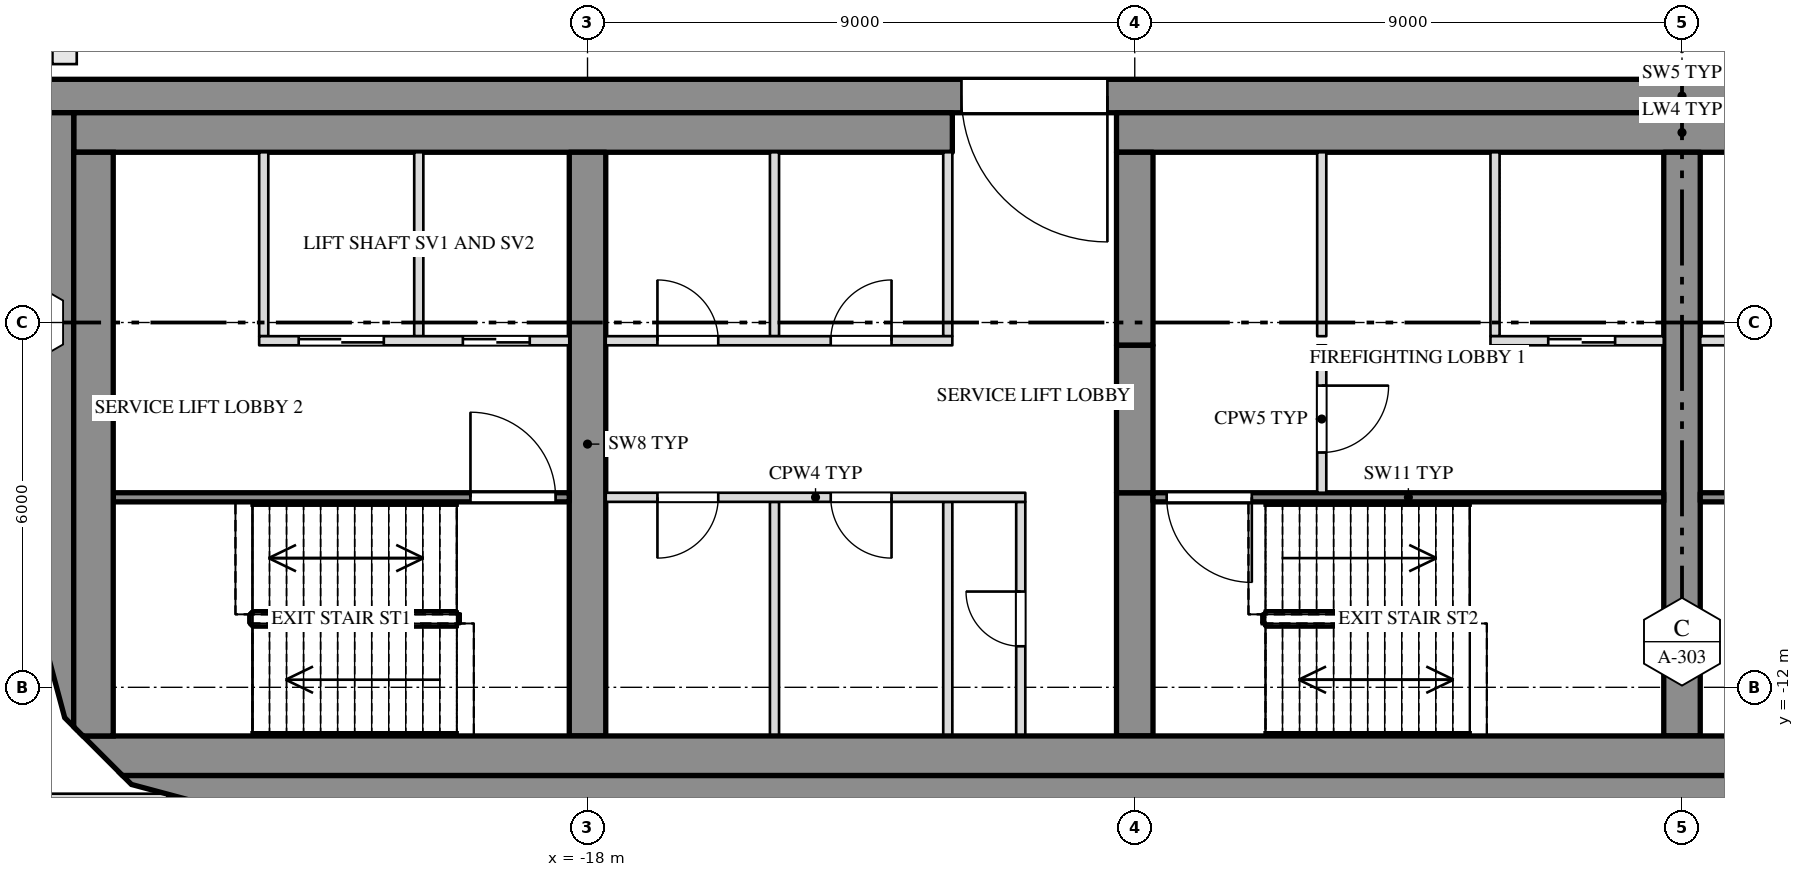
"""IFC4 building model, lengths in metres.
Left out: names, types, materials, properties, quantities, classifications, styles, units other than length and angle.
Written with IfcOpenShell. Run it as: python <this file> out.ifc"""

import sys

from ifc_helpers import new_model, si_unit, direction, frame, frame_2d, origin, place, context, subcontext, project, spatial, polyline, rectangle, outline, extrude, element, fill, save


model = new_model("IFC4")
c1 = context("Model", 3, precision=1e-05, world=origin(), true_north=direction((0.0, 1.0)))
c2 = subcontext(c1, "Body", "Model", "MODEL_VIEW")
j1 = project(units=[si_unit("LENGTHUNIT", "METRE"), si_unit("PLANEANGLEUNIT", "RADIAN")], contexts=[c1])
p1 = place(None, origin())
s1 = spatial("IfcSite", under=j1, at=p1, CompositionType="ELEMENT")
p2 = place(p1, origin())
s2 = spatial("IfcBuilding", under=s1, at=p2, CompositionType="ELEMENT")
p3 = place(p2, frame((0.0, 0.0, 296.5)))
s3 = spatial("IfcBuildingStorey", under=s2, at=p3, CompositionType="ELEMENT", Elevation=296.5)
p4 = place(p3, frame((-27.0, -2.275, 0.0), z_axis=(0.0, 0.0, 1.0), x_axis=(1.0, 0.0, 0.0)))
e1 = element("IfcWall", 1, at=p4, inside=s3, PredefinedType="SHEAR", context=c2, shape_type="SweptSolid", body=[
    extrude(rectangle(XDim=54.0, YDim=0.55, at=frame_2d((27.0, 0.0))), origin(), (0.0, 0.0, 1.0), 8.65),
])
p5 = place(p4, frame((15.15, 0.0, 0.0)))
e2 = element("IfcOpeningElement", 2, at=p5, cuts=e1, PredefinedType="OPENING", context=c2, shape_type="SweptSolid", body=[
    extrude(rectangle(XDim=2.4, YDim=2.1, at=frame_2d((1.2, 1.05))), frame((0.0, 0.287, 0.0), z_axis=(0.0, -1.0, 0.0), x_axis=(1.0, 0.0, 0.0)), (0.0, 0.0, 1.0), 0.574),
])
p6 = place(p4, frame((36.45, 0.0, 0.0)))
e3 = element("IfcOpeningElement", 3, at=p6, cuts=e1, PredefinedType="OPENING", context=c2, shape_type="SweptSolid", body=[
    extrude(rectangle(XDim=2.4, YDim=2.1, at=frame_2d((1.2, 1.05))), frame((0.0, 0.287, 0.0), z_axis=(0.0, -1.0, 0.0), x_axis=(1.0, 0.0, 0.0)), (0.0, 0.0, 1.0), 0.574),
])
p7 = place(p3, origin())
e4 = element("IfcWall", 4, at=p7, inside=s3, PredefinedType="SHEAR", context=c2, shape_type="SweptSolid", body=[
    extrude(outline(polyline([(25.648, -13.45), (25.5, -13.598), (24.0, -14.0), (-24.0, -14.0), (-25.5, -13.598), (-25.648, -13.45), (25.648, -13.45)])), origin(), (0.0, 0.0, 1.0), 8.65),
])
p8 = place(p3, origin())
e5 = element("IfcWall", 5, at=p8, inside=s3, PredefinedType="SHEAR", context=c2, shape_type="SweptSolid", body=[
    extrude(outline(polyline([(-26.45, -2.55), (-26.45, -12.648), (-26.598, -12.5), (-27.0, -11.0), (-27.0, -2.55), (-26.45, -2.55)])), origin(), (0.0, 0.0, 1.0), 8.65),
])
p9 = place(p3, frame((-26.45, -2.875, 0.0), z_axis=(0.0, 0.0, 1.0), x_axis=(1.0, 0.0, 0.0)))
e6 = element("IfcWall", 6, at=p9, inside=s3, PredefinedType="SHEAR", context=c2, shape_type="SweptSolid", body=[
    extrude(rectangle(XDim=14.45, YDim=0.65, at=frame_2d((7.225, 0.0))), origin(), (0.0, 0.0, 1.0), 8.65),
])
p10 = place(p3, frame((-9.3, -2.875, 0.0), z_axis=(0.0, 0.0, 1.0), x_axis=(1.0, 0.0, 0.0)))
e7 = element("IfcWall", 7, at=p10, inside=s3, PredefinedType="SHEAR", context=c2, shape_type="SweptSolid", body=[
    extrude(rectangle(XDim=18.6, YDim=0.65, at=frame_2d((9.3, 0.0))), origin(), (0.0, 0.0, 1.0), 8.65),
])
p11 = place(p3, origin())
e8 = element("IfcWall", 8, at=p11, inside=s3, PredefinedType="SHEAR", context=c2, shape_type="SweptSolid", body=[
    extrude(outline(polyline([(26.298, -12.8), (25.648, -13.45), (-25.648, -13.45), (-26.298, -12.8), (26.298, -12.8)])), origin(), (0.0, 0.0, 1.0), 8.65),
])
p12 = place(p3, origin())
e9 = element("IfcWall", 9, at=p12, inside=s3, PredefinedType="SHEAR", context=c2, shape_type="SweptSolid", body=[
    extrude(outline(polyline([(-26.45, -3.2), (-25.8, -3.2), (-25.8, -12.8), (-26.298, -12.8), (-26.45, -12.648), (-26.45, -3.2)])), origin(), (0.0, 0.0, 1.0), 8.65),
])
p13 = place(p3, frame((-18.0, -12.8, 0.0), z_axis=(0.0, 0.0, 1.0), x_axis=(0.0, 1.0, 0.0)))
e10 = element("IfcWall", 10, at=p13, inside=s3, PredefinedType="SHEAR", context=c2, shape_type="SweptSolid", body=[
    extrude(rectangle(XDim=9.6, YDim=0.6, at=frame_2d((4.8, 0.0))), origin(), (0.0, 0.0, 1.0), 8.65),
])
p14 = place(p3, frame((-9.0, -12.8, 0.0), z_axis=(0.0, 0.0, 1.0), x_axis=(0.0, 1.0, 0.0)))
e11 = element("IfcWall", 11, at=p14, inside=s3, PredefinedType="SHEAR", context=c2, shape_type="SweptSolid", body=[
    extrude(rectangle(XDim=4.0, YDim=0.6, at=frame_2d((2.0, 0.0))), origin(), (0.0, 0.0, 1.0), 8.65),
])
p15 = place(p3, frame((-9.0, -6.375, 0.0), z_axis=(0.0, 0.0, 1.0), x_axis=(0.0, 1.0, 0.0)))
e12 = element("IfcWall", 12, at=p15, inside=s3, PredefinedType="SHEAR", context=c2, shape_type="SweptSolid", body=[
    extrude(rectangle(XDim=3.175, YDim=0.6, at=frame_2d((1.587, 0.0))), origin(), (0.0, 0.0, 1.0), 8.65),
])
p16 = place(p3, frame((-9.0, -8.8, 3.6), z_axis=(0.0, 0.0, 1.0), x_axis=(0.0, 1.0, 0.0)))
e13 = element("IfcWall", 13, at=p16, inside=s3, PredefinedType="SHEAR", context=c2, shape_type="SweptSolid", body=[
    extrude(rectangle(XDim=2.425, YDim=0.6, at=frame_2d((1.212, 0.0))), origin(), (0.0, 0.0, 1.0), 5.05),
])
p17 = place(p3, frame((0.0, -12.8, 0.0), z_axis=(0.0, 0.0, 1.0), x_axis=(0.0, 1.0, 0.0)))
e14 = element("IfcWall", 14, at=p17, inside=s3, PredefinedType="SHEAR", context=c2, shape_type="SweptSolid", body=[
    extrude(rectangle(XDim=9.6, YDim=0.6, at=frame_2d((4.8, 0.0))), origin(), (0.0, 0.0, 1.0), 8.65),
])
p18 = place(p3, frame((-26.967, -13.875, 0.0), z_axis=(0.0, 0.0, 1.0), x_axis=(1.0, 0.0, 0.0)))
e15 = element("IfcWall", 15, at=p18, inside=s3, PredefinedType="PARAPET", context=c2, shape_type="SweptSolid", body=[
    extrude(rectangle(XDim=2.057, YDim=0.25, at=frame_2d((1.028, 0.0))), origin(), (0.0, 0.0, 1.0), 1.1),
])
for number, where, z_axis, x_axis in (
    (16, (-20.775, -6.225, 0.0), (0.0, 0.0, 1.0), (0.0, 1.0, 0.0)),
    (17, (-23.325, -6.225, 0.0), (0.0, 0.0, 1.0), (0.0, 1.0, 0.0)),
    (18, (-12.075, -6.225, 0.0), (0.0, 0.0, 1.0), (0.0, 1.0, 0.0)),
    (19, (-14.925, -6.225, 0.0), (0.0, 0.0, 1.0), (0.0, 1.0, 0.0)),
    (20, (-3.075, -6.225, 0.0), (0.0, 0.0, 1.0), (0.0, 1.0, 0.0)),
    (21, (-5.925, -6.225, 0.0), (0.0, 0.0, 1.0), (0.0, 1.0, 0.0)),
):
    element("IfcWall", number, at=place(p3, frame(where, z_axis=z_axis, x_axis=x_axis)), inside=s3, PredefinedType="PARTITIONING", context=c2, shape_type="SweptSolid", body=[
        extrude(rectangle(XDim=3.025, YDim=0.15, at=frame_2d((1.513, 0.0))), origin(), (0.0, 0.0, 1.0), 8.65),
    ])
p19 = place(p3, frame((-10.875, -12.8, 0.0), z_axis=(0.0, 0.0, 1.0), x_axis=(0.0, 1.0, 0.0)))
e22 = element("IfcWall", 22, at=p19, inside=s3, PredefinedType="PARTITIONING", context=c2, shape_type="SweptSolid", body=[
    extrude(rectangle(XDim=3.85, YDim=0.15, at=frame_2d((1.925, 0.0))), origin(), (0.0, 0.0, 1.0), 8.65),
])
p20 = place(p19, frame((1.475, 0.0, 0.0)))
e23 = element("IfcOpeningElement", 23, at=p20, cuts=e22, PredefinedType="OPENING", context=c2, shape_type="SweptSolid", body=[
    extrude(rectangle(XDim=0.9, YDim=2.1, at=frame_2d((0.45, 1.05))), frame((0.0, 0.087, 0.0), z_axis=(0.0, -1.0, 0.0), x_axis=(1.0, 0.0, 0.0)), (0.0, 0.0, 1.0), 0.174),
])
for number, where, z_axis, x_axis in (
    (24, (-12.075, -12.8, 0.0), (0.0, 0.0, 1.0), (0.0, 1.0, 0.0)),
    (25, (-14.925, -12.8, 0.0), (0.0, 0.0, 1.0), (0.0, 1.0, 0.0)),
):
    element("IfcWall", number, at=place(p3, frame(where, z_axis=z_axis, x_axis=x_axis)), inside=s3, PredefinedType="PARTITIONING", context=c2, shape_type="SweptSolid", body=[
        extrude(rectangle(XDim=3.85, YDim=0.15, at=frame_2d((1.925, 0.0))), origin(), (0.0, 0.0, 1.0), 8.65),
    ])
p21 = place(p3, frame((-5.925, -8.8, 0.0), z_axis=(0.0, 0.0, 1.0), x_axis=(0.0, 1.0, 0.0)))
e26 = element("IfcWall", 26, at=p21, inside=s3, PredefinedType="PARTITIONING", context=c2, shape_type="SweptSolid", body=[
    extrude(rectangle(XDim=2.425, YDim=0.15, at=frame_2d((1.212, 0.0))), origin(), (0.0, 0.0, 1.0), 8.65),
])
p22 = place(p21, frame((0.662, 0.0, 0.0)))
e27 = element("IfcOpeningElement", 27, at=p22, cuts=e26, PredefinedType="OPENING", context=c2, shape_type="SweptSolid", body=[
    extrude(rectangle(XDim=1.1, YDim=2.1, at=frame_2d((0.55, 1.05))), frame((0.0, 0.087, 0.0), z_axis=(0.0, -1.0, 0.0), x_axis=(1.0, 0.0, 0.0)), (0.0, 0.0, 1.0), 0.174),
])
p23 = place(p3, frame((-23.4, -6.3, 0.0), z_axis=(0.0, 0.0, 1.0), x_axis=(1.0, 0.0, 0.0)))
e28 = element("IfcWall", 28, at=p23, inside=s3, PredefinedType="PARTITIONING", context=c2, shape_type="SweptSolid", body=[
    extrude(rectangle(XDim=5.1, YDim=0.15, at=frame_2d((2.55, 0.0))), origin(), (0.0, 0.0, 1.0), 8.65),
])
p24 = place(p23, frame((0.65, 0.0, 0.0)))
e29 = element("IfcOpeningElement", 29, at=p24, cuts=e28, PredefinedType="OPENING", context=c2, shape_type="SweptSolid", body=[
    extrude(rectangle(XDim=1.4, YDim=2.1, at=frame_2d((0.7, 1.05))), frame((0.0, 0.087, 0.0), z_axis=(0.0, -1.0, 0.0), x_axis=(1.0, 0.0, 0.0)), (0.0, 0.0, 1.0), 0.174),
])
p25 = place(p23, frame((3.35, 0.0, 0.0)))
e30 = element("IfcOpeningElement", 30, at=p25, cuts=e28, PredefinedType="OPENING", context=c2, shape_type="SweptSolid", body=[
    extrude(rectangle(XDim=1.1, YDim=2.1, at=frame_2d((0.55, 1.05))), frame((0.0, 0.087, 0.0), z_axis=(0.0, -1.0, 0.0), x_axis=(1.0, 0.0, 0.0)), (0.0, 0.0, 1.0), 0.174),
])
p26 = place(p3, frame((-17.7, -6.3, 0.0), z_axis=(0.0, 0.0, 1.0), x_axis=(1.0, 0.0, 0.0)))
e31 = element("IfcWall", 31, at=p26, inside=s3, PredefinedType="PARTITIONING", context=c2, shape_type="SweptSolid", body=[
    extrude(rectangle(XDim=5.7, YDim=0.15, at=frame_2d((2.85, 0.0))), origin(), (0.0, 0.0, 1.0), 8.65),
])
p27 = place(p26, frame((0.85, 0.0, 0.0)))
e32 = element("IfcOpeningElement", 32, at=p27, cuts=e31, PredefinedType="OPENING", context=c2, shape_type="SweptSolid", body=[
    extrude(rectangle(XDim=1.0, YDim=2.1, at=frame_2d((0.5, 1.05))), frame((0.0, 0.087, 0.0), z_axis=(0.0, -1.0, 0.0), x_axis=(1.0, 0.0, 0.0)), (0.0, 0.0, 1.0), 0.174),
])
p28 = place(p26, frame((3.7, 0.0, 0.0)))
e33 = element("IfcOpeningElement", 33, at=p28, cuts=e31, PredefinedType="OPENING", context=c2, shape_type="SweptSolid", body=[
    extrude(rectangle(XDim=1.0, YDim=2.1, at=frame_2d((0.5, 1.05))), frame((0.0, 0.087, 0.0), z_axis=(0.0, -1.0, 0.0), x_axis=(1.0, 0.0, 0.0)), (0.0, 0.0, 1.0), 0.174),
])
p29 = place(p3, frame((-3.15, -6.3, 0.0), z_axis=(0.0, 0.0, 1.0), x_axis=(1.0, 0.0, 0.0)))
e34 = element("IfcWall", 34, at=p29, inside=s3, PredefinedType="PARTITIONING", context=c2, shape_type="SweptSolid", body=[
    extrude(rectangle(XDim=2.85, YDim=0.15, at=frame_2d((1.425, 0.0))), origin(), (0.0, 0.0, 1.0), 8.65),
])
p30 = place(p29, frame((0.95, 0.0, 0.0)))
e35 = element("IfcOpeningElement", 35, at=p30, cuts=e34, PredefinedType="OPENING", context=c2, shape_type="SweptSolid", body=[
    extrude(rectangle(XDim=1.1, YDim=2.1, at=frame_2d((0.55, 1.05))), frame((0.0, 0.087, 0.0), z_axis=(0.0, -1.0, 0.0), x_axis=(1.0, 0.0, 0.0)), (0.0, 0.0, 1.0), 0.174),
])
p31 = place(p3, frame((0.3, -6.3, 0.0), z_axis=(0.0, 0.0, 1.0), x_axis=(1.0, 0.0, 0.0)))
e36 = element("IfcWall", 36, at=p31, inside=s3, PredefinedType="PARTITIONING", context=c2, shape_type="SweptSolid", body=[
    extrude(rectangle(XDim=2.85, YDim=0.15, at=frame_2d((1.425, 0.0))), origin(), (0.0, 0.0, 1.0), 8.65),
])
p32 = place(p31, frame((0.8, 0.0, 0.0)))
e37 = element("IfcOpeningElement", 37, at=p32, cuts=e36, PredefinedType="OPENING", context=c2, shape_type="SweptSolid", body=[
    extrude(rectangle(XDim=1.1, YDim=2.1, at=frame_2d((0.55, 1.05))), frame((0.0, 0.087, 0.0), z_axis=(0.0, -1.0, 0.0), x_axis=(1.0, 0.0, 0.0)), (0.0, 0.0, 1.0), 0.174),
])
p33 = place(p3, frame((-25.8, -8.875, 0.0), z_axis=(0.0, 0.0, 1.0), x_axis=(1.0, 0.0, 0.0)))
e38 = element("IfcWall", 38, at=p33, inside=s3, PredefinedType="SHEAR", context=c2, shape_type="SweptSolid", body=[
    extrude(rectangle(XDim=7.5, YDim=0.15, at=frame_2d((3.75, 0.0))), origin(), (0.0, 0.0, 1.0), 8.65),
])
p34 = place(p33, frame((5.875, 0.0, 0.0)))
e39 = element("IfcOpeningElement", 39, at=p34, cuts=e38, PredefinedType="OPENING", context=c2, shape_type="SweptSolid", body=[
    extrude(rectangle(XDim=1.4, YDim=2.1, at=frame_2d((0.7, 1.05))), frame((0.0, 0.087, 0.0), z_axis=(0.0, -1.0, 0.0), x_axis=(1.0, 0.0, 0.0)), (0.0, 0.0, 1.0), 0.174),
])
p35 = place(p3, frame((-17.7, -8.875, 0.0), z_axis=(0.0, 0.0, 1.0), x_axis=(1.0, 0.0, 0.0)))
e40 = element("IfcWall", 40, at=p35, inside=s3, PredefinedType="PARTITIONING", context=c2, shape_type="SweptSolid", body=[
    extrude(rectangle(XDim=6.9, YDim=0.15, at=frame_2d((3.45, 0.0))), origin(), (0.0, 0.0, 1.0), 8.65),
])
p36 = place(p35, frame((0.85, 0.0, 0.0)))
e41 = element("IfcOpeningElement", 41, at=p36, cuts=e40, PredefinedType="OPENING", context=c2, shape_type="SweptSolid", body=[
    extrude(rectangle(XDim=1.0, YDim=2.1, at=frame_2d((0.5, 1.05))), frame((0.0, 0.087, 0.0), z_axis=(0.0, -1.0, 0.0), x_axis=(1.0, 0.0, 0.0)), (0.0, 0.0, 1.0), 0.174),
])
p37 = place(p35, frame((3.7, 0.0, 0.0)))
e42 = element("IfcOpeningElement", 42, at=p37, cuts=e40, PredefinedType="OPENING", context=c2, shape_type="SweptSolid", body=[
    extrude(rectangle(XDim=1.0, YDim=2.1, at=frame_2d((0.5, 1.05))), frame((0.0, 0.087, 0.0), z_axis=(0.0, -1.0, 0.0), x_axis=(1.0, 0.0, 0.0)), (0.0, 0.0, 1.0), 0.174),
])
p38 = place(p3, frame((-8.7, -8.875, 0.0), z_axis=(0.0, 0.0, 1.0), x_axis=(1.0, 0.0, 0.0)))
e43 = element("IfcWall", 43, at=p38, inside=s3, PredefinedType="SHEAR", context=c2, shape_type="SweptSolid", body=[
    extrude(rectangle(XDim=8.4, YDim=0.15, at=frame_2d((4.2, 0.0))), origin(), (0.0, 0.0, 1.0), 8.65),
])
p39 = place(p38, frame((0.225, 0.0, 0.0)))
e44 = element("IfcOpeningElement", 44, at=p39, cuts=e43, PredefinedType="OPENING", context=c2, shape_type="SweptSolid", body=[
    extrude(rectangle(XDim=1.4, YDim=2.1, at=frame_2d((0.7, 1.05))), frame((0.0, 0.087, 0.0), z_axis=(0.0, -1.0, 0.0), x_axis=(1.0, 0.0, 0.0)), (0.0, 0.0, 1.0), 0.174),
])
p40 = place(p3, frame((0.3, -8.875, 0.0), z_axis=(0.0, 0.0, 1.0), x_axis=(1.0, 0.0, 0.0)))
e45 = element("IfcWall", 45, at=p40, inside=s3, PredefinedType="SHEAR", context=c2, shape_type="SweptSolid", body=[
    extrude(rectangle(XDim=8.4, YDim=0.15, at=frame_2d((4.2, 0.0))), origin(), (0.0, 0.0, 1.0), 8.65),
])
p41 = place(p40, frame((6.775, 0.0, 0.0)))
e46 = element("IfcOpeningElement", 46, at=p41, cuts=e45, PredefinedType="OPENING", context=c2, shape_type="SweptSolid", body=[
    extrude(rectangle(XDim=1.4, YDim=2.1, at=frame_2d((0.7, 1.05))), frame((0.0, 0.087, 0.0), z_axis=(0.0, -1.0, 0.0), x_axis=(1.0, 0.0, 0.0)), (0.0, 0.0, 1.0), 0.174),
])
p42 = place(p24, origin())
e47 = element("IfcDoor", 47, at=p42, inside=s3, OperationType="SLIDING_TO_LEFT", PredefinedType="DOOR", context=c2, shape_type="SweptSolid", body=[
    extrude(rectangle(XDim=1.4, YDim=2.1, at=frame_2d((0.7, 1.05))), frame((0.0, 0.025, 0.0), z_axis=(0.0, -1.0, 0.0), x_axis=(1.0, 0.0, 0.0)), (0.0, 0.0, 1.0), 0.05),
])
fill(e29, e47)
p43 = place(p25, origin())
e48 = element("IfcDoor", 48, at=p43, inside=s3, OperationType="SLIDING_TO_RIGHT", PredefinedType="DOOR", context=c2, shape_type="SweptSolid", body=[
    extrude(rectangle(XDim=1.1, YDim=2.1, at=frame_2d((0.55, 1.05))), frame((0.0, 0.025, 0.0), z_axis=(0.0, -1.0, 0.0), x_axis=(1.0, 0.0, 0.0)), (0.0, 0.0, 1.0), 0.05),
])
fill(e30, e48)
p44 = place(p34, origin())
e49 = element("IfcDoor", 49, at=p44, inside=s3, OperationType="DOUBLE_DOOR_SINGLE_SWING", PredefinedType="DOOR", context=c2, shape_type="SweptSolid", body=[
    extrude(rectangle(XDim=1.4, YDim=2.1, at=frame_2d((0.7, 1.05))), frame((0.0, 0.025, 0.0), z_axis=(0.0, -1.0, 0.0), x_axis=(1.0, 0.0, 0.0)), (0.0, 0.0, 1.0), 0.05),
])
fill(e39, e49)
p45 = place(p36, origin())
e50 = element("IfcDoor", 50, at=p45, inside=s3, OperationType="SINGLE_SWING_RIGHT", PredefinedType="DOOR", context=c2, shape_type="SweptSolid", body=[
    extrude(rectangle(XDim=1.0, YDim=2.1, at=frame_2d((0.5, 1.05))), frame((0.0, 0.025, 0.0), z_axis=(0.0, -1.0, 0.0), x_axis=(1.0, 0.0, 0.0)), (0.0, 0.0, 1.0), 0.05),
])
fill(e41, e50)
p46 = place(p27, origin())
e51 = element("IfcDoor", 51, at=p46, inside=s3, OperationType="SINGLE_SWING_LEFT", PredefinedType="DOOR", context=c2, shape_type="SweptSolid", body=[
    extrude(rectangle(XDim=1.0, YDim=2.1, at=frame_2d((0.5, 1.05))), frame((0.0, 0.025, 0.0), z_axis=(0.0, -1.0, 0.0), x_axis=(1.0, 0.0, 0.0)), (0.0, 0.0, 1.0), 0.05),
])
fill(e32, e51)
p47 = place(p37, origin())
e52 = element("IfcDoor", 52, at=p47, inside=s3, OperationType="SINGLE_SWING_LEFT", PredefinedType="DOOR", context=c2, shape_type="SweptSolid", body=[
    extrude(rectangle(XDim=1.0, YDim=2.1, at=frame_2d((0.5, 1.05))), frame((0.0, 0.025, 0.0), z_axis=(0.0, -1.0, 0.0), x_axis=(1.0, 0.0, 0.0)), (0.0, 0.0, 1.0), 0.05),
])
fill(e42, e52)
p48 = place(p28, origin())
e53 = element("IfcDoor", 53, at=p48, inside=s3, OperationType="SINGLE_SWING_RIGHT", PredefinedType="DOOR", context=c2, shape_type="SweptSolid", body=[
    extrude(rectangle(XDim=1.0, YDim=2.1, at=frame_2d((0.5, 1.05))), frame((0.0, 0.025, 0.0), z_axis=(0.0, -1.0, 0.0), x_axis=(1.0, 0.0, 0.0)), (0.0, 0.0, 1.0), 0.05),
])
fill(e33, e53)
p49 = place(p20, origin())
e54 = element("IfcDoor", 54, at=p49, inside=s3, OperationType="SINGLE_SWING_RIGHT", PredefinedType="DOOR", context=c2, shape_type="SweptSolid", body=[
    extrude(rectangle(XDim=0.9, YDim=2.1, at=frame_2d((0.45, 1.05))), frame((0.0, 0.025, 0.0), z_axis=(0.0, -1.0, 0.0), x_axis=(1.0, 0.0, 0.0)), (0.0, 0.0, 1.0), 0.05),
])
fill(e23, e54)
p50 = place(p5, origin())
e55 = element("IfcDoor", 55, at=p50, inside=s3, OperationType="DOUBLE_DOOR_SINGLE_SWING", PredefinedType="DOOR", context=c2, shape_type="SweptSolid", body=[
    extrude(rectangle(XDim=2.4, YDim=2.1, at=frame_2d((1.2, 1.05))), frame((0.0, 0.025, 0.0), z_axis=(0.0, -1.0, 0.0), x_axis=(1.0, 0.0, 0.0)), (0.0, 0.0, 1.0), 0.05),
])
fill(e2, e55)
p51 = place(p39, origin())
e56 = element("IfcDoor", 56, at=p51, inside=s3, OperationType="DOUBLE_DOOR_SINGLE_SWING", PredefinedType="DOOR", context=c2, shape_type="SweptSolid", body=[
    extrude(rectangle(XDim=1.4, YDim=2.1, at=frame_2d((0.7, 1.05))), frame((0.0, 0.025, 0.0), z_axis=(0.0, -1.0, 0.0), x_axis=(1.0, 0.0, 0.0)), (0.0, 0.0, 1.0), 0.05),
])
fill(e44, e56)
p52 = place(p22, origin())
e57 = element("IfcDoor", 57, at=p52, inside=s3, OperationType="SINGLE_SWING_LEFT", PredefinedType="DOOR", context=c2, shape_type="SweptSolid", body=[
    extrude(rectangle(XDim=1.1, YDim=2.1, at=frame_2d((0.55, 1.05))), frame((0.0, 0.025, 0.0), z_axis=(0.0, -1.0, 0.0), x_axis=(1.0, 0.0, 0.0)), (0.0, 0.0, 1.0), 0.05),
])
fill(e27, e57)
p53 = place(p30, origin())
e58 = element("IfcDoor", 58, at=p53, inside=s3, OperationType="SLIDING_TO_RIGHT", PredefinedType="DOOR", context=c2, shape_type="SweptSolid", body=[
    extrude(rectangle(XDim=1.1, YDim=2.1, at=frame_2d((0.55, 1.05))), frame((0.0, 0.025, 0.0), z_axis=(0.0, -1.0, 0.0), x_axis=(1.0, 0.0, 0.0)), (0.0, 0.0, 1.0), 0.05),
])
fill(e35, e58)
save(model, sys.argv[1])
